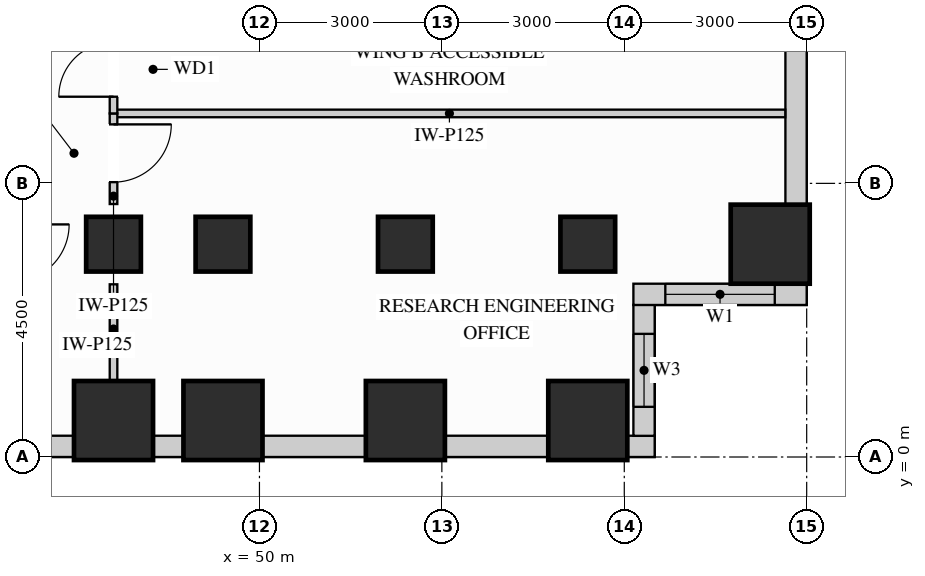
"""IFC4 building model, lengths in metres.
Left out: names, types, materials, properties, quantities, classifications, styles, units other than length and angle.
Written with IfcOpenShell. Run it as: python <this file> out.ifc"""

import sys

from ifc_helpers import new_model, si_unit, direction, frame, frame_2d, origin, origin_2d, place, context, subcontext, project, spatial, rectangle, extrude, source, transform, mapped, element, fill, save


model = new_model("IFC4")
c1 = context("Model", 3, precision=1e-05, world=origin(), true_north=direction((0.0, 1.0)))
c2 = subcontext(c1, "Body", "Model", "MODEL_VIEW")
j1 = project(units=[si_unit("LENGTHUNIT", "METRE"), si_unit("PLANEANGLEUNIT", "RADIAN")], contexts=[c1])
p1 = place(None, origin())
s1 = spatial("IfcSite", under=j1, at=p1, CompositionType="ELEMENT")
p2 = place(p1, origin())
s2 = spatial("IfcBuilding", under=s1, at=p2, CompositionType="ELEMENT")
p3 = place(p2, frame((0.0, 0.0, 36.9)))
s3 = spatial("IfcBuildingStorey", under=s2, at=p3, CompositionType="ELEMENT", Elevation=36.9)
m1 = source(origin(), c2, "Body", "SweptSolid", [
    extrude(rectangle(XDim=0.9, YDim=0.9, at=origin_2d()), origin(), (0.0, 0.0, 1.0), 3.38),
])
for number, where, z_axis, x_axis in (
    (1, (47.6, 3.5, 0.0), (0.0, 0.0, 1.0), (1.0, 0.0, 0.0)),
    (2, (49.4, 3.5, 0.0), (0.0, 0.0, 1.0), (1.0, 0.0, 0.0)),
    (3, (52.4, 3.5, 0.0), (0.0, 0.0, 1.0), (1.0, 0.0, 0.0)),
    (4, (55.4, 3.5, 0.0), (0.0, 0.0, 1.0), (1.0, 0.0, 0.0)),
):
    element("IfcColumn", number, at=place(p3, frame(where, z_axis=z_axis, x_axis=x_axis)), inside=s3, PredefinedType="COLUMN", context=c2, shape_type="MappedRepresentation", body=[
        mapped(m1, transform((0.0, 0.0, 0.0), x_axis=(1.0, 0.0, 0.0), y_axis=(0.0, 1.0, 0.0), z_axis=(0.0, 0.0, 1.0))),
    ])
m2 = source(origin(), c2, "Body", "SweptSolid", [
    extrude(rectangle(XDim=1.3, YDim=1.3, at=origin_2d()), origin(), (0.0, 0.0, 1.0), 3.38),
])
for number, where, z_axis, x_axis in (
    (5, (58.4, 3.5, 0.0), (0.0, 0.0, 1.0), (1.0, 0.0, 0.0)),
    (6, (47.6, 0.6, 0.0), (0.0, 0.0, 1.0), (1.0, 0.0, 0.0)),
    (7, (49.4, 0.6, 0.0), (0.0, 0.0, 1.0), (1.0, 0.0, 0.0)),
    (8, (52.4, 0.6, 0.0), (0.0, 0.0, 1.0), (1.0, 0.0, 0.0)),
    (9, (55.4, 0.6, 0.0), (0.0, 0.0, 1.0), (1.0, 0.0, 0.0)),
):
    element("IfcColumn", number, at=place(p3, frame(where, z_axis=z_axis, x_axis=x_axis)), inside=s3, PredefinedType="COLUMN", context=c2, shape_type="MappedRepresentation", body=[
        mapped(m2, transform((0.0, 0.0, 0.0), x_axis=(1.0, 0.0, 0.0), y_axis=(0.0, 1.0, 0.0), z_axis=(0.0, 0.0, 1.0))),
    ])
p4 = place(p3, frame((40.648, 0.175, 0.0), z_axis=(0.0, 0.0, 1.0), x_axis=(1.0, 0.0, 0.0)))
e10 = element("IfcWall", 10, at=p4, inside=s3, PredefinedType="SOLIDWALL", context=c2, shape_type="SweptSolid", body=[
    extrude(rectangle(XDim=6.304, YDim=0.35, at=frame_2d((3.152, 0.0))), origin(), (0.0, 0.0, 1.0), 2.51),
])
p5 = place(p4, frame((0.687, 0.0, 0.78)))
e11 = element("IfcOpeningElement", 11, at=p5, cuts=e10, PredefinedType="OPENING", context=c2, shape_type="SweptSolid", body=[
    extrude(rectangle(XDim=1.8, YDim=1.55, at=frame_2d((0.9, 0.775))), frame((0.0, 0.185, 0.0), z_axis=(0.0, -1.0, 0.0), x_axis=(1.0, 0.0, 0.0)), (0.0, 0.0, 1.0), 0.37),
])
p6 = place(p4, frame((2.855, 0.0, 0.78)))
e12 = element("IfcOpeningElement", 12, at=p6, cuts=e10, PredefinedType="OPENING", context=c2, shape_type="SweptSolid", body=[
    extrude(rectangle(XDim=1.8, YDim=1.55, at=frame_2d((0.9, 0.775))), frame((0.0, 0.185, 0.0), z_axis=(0.0, -1.0, 0.0), x_axis=(1.0, 0.0, 0.0)), (0.0, 0.0, 1.0), 0.37),
])
m3 = source(origin(), c2, "Body", "SweptSolid", [
    extrude(rectangle(XDim=0.504, YDim=0.35, at=frame_2d((0.252, 0.0))), origin(), (0.0, 0.0, 1.0), 3.365),
])
p7 = place(p3, frame((48.248, 0.175, 0.0), z_axis=(0.0, 0.0, 1.0), x_axis=(1.0, 0.0, 0.0)))
e13 = element("IfcWall", 13, at=p7, inside=s3, PredefinedType="SOLIDWALL", context=c2, shape_type="MappedRepresentation", body=[
    mapped(m3, transform((0.0, 0.0, 0.0), x_axis=(1.0, 0.0, 0.0), y_axis=(0.0, 1.0, 0.0), z_axis=(0.0, 0.0, 1.0))),
])
m4 = source(origin(), c2, "Body", "SweptSolid", [
    extrude(rectangle(XDim=1.704, YDim=0.35, at=frame_2d((0.852, 0.0))), origin(), (0.0, 0.0, 1.0), 2.51),
])
for number, where, z_axis, x_axis in (
    (14, (50.048, 0.175, 0.0), (0.0, 0.0, 1.0), (1.0, 0.0, 0.0)),
    (15, (53.048, 0.175, 0.0), (0.0, 0.0, 1.0), (1.0, 0.0, 0.0)),
):
    element("IfcWall", number, at=place(p3, frame(where, z_axis=z_axis, x_axis=x_axis)), inside=s3, PredefinedType="SOLIDWALL", context=c2, shape_type="MappedRepresentation", body=[
        mapped(m4, transform((0.0, 0.0, 0.0), x_axis=(1.0, 0.0, 0.0), y_axis=(0.0, 1.0, 0.0), z_axis=(0.0, 0.0, 1.0))),
    ])
m5 = source(origin(), c2, "Body", "SweptSolid", [
    extrude(rectangle(XDim=0.452, YDim=0.35, at=frame_2d((0.226, 0.0))), origin(), (0.0, 0.0, 1.0), 3.365),
])
p8 = place(p3, frame((56.048, 0.175, 0.0), z_axis=(0.0, 0.0, 1.0), x_axis=(1.0, 0.0, 0.0)))
e16 = element("IfcWall", 16, at=p8, inside=s3, PredefinedType="SOLIDWALL", context=c2, shape_type="MappedRepresentation", body=[
    mapped(m5, transform((0.0, 0.0, 0.0), x_axis=(1.0, 0.0, 0.0), y_axis=(0.0, 1.0, 0.0), z_axis=(0.0, 0.0, 1.0))),
])
p9 = place(p3, frame((56.325, 0.348, 0.0), z_axis=(0.0, 0.0, 1.0), x_axis=(0.0, 1.0, 0.0)))
e17 = element("IfcWall", 17, at=p9, inside=s3, PredefinedType="SOLIDWALL", context=c2, shape_type="SweptSolid", body=[
    extrude(rectangle(XDim=2.154, YDim=0.35, at=frame_2d((1.077, 0.0))), origin(), (0.0, 0.0, 1.0), 3.365),
])
p10 = place(p9, frame((0.477, 0.0, 0.78)))
e18 = element("IfcOpeningElement", 18, at=p10, cuts=e17, PredefinedType="OPENING", context=c2, shape_type="SweptSolid", body=[
    extrude(rectangle(XDim=1.2, YDim=2.1, at=frame_2d((0.6, 1.05))), frame((0.0, 0.185, 0.0), z_axis=(0.0, -1.0, 0.0), x_axis=(1.0, 0.0, 0.0)), (0.0, 0.0, 1.0), 0.37),
])
p11 = place(p3, frame((56.15, 2.675, 0.0), z_axis=(0.0, 0.0, 1.0), x_axis=(1.0, 0.0, 0.0)))
e19 = element("IfcWall", 19, at=p11, inside=s3, PredefinedType="SOLIDWALL", context=c2, shape_type="SweptSolid", body=[
    extrude(rectangle(XDim=2.85, YDim=0.35, at=frame_2d((1.425, 0.0))), origin(), (0.0, 0.0, 1.0), 3.365),
])
p12 = place(p11, frame((0.525, 0.0, 0.78)))
e20 = element("IfcOpeningElement", 20, at=p12, cuts=e19, PredefinedType="OPENING", context=c2, shape_type="SweptSolid", body=[
    extrude(rectangle(XDim=1.8, YDim=2.1, at=frame_2d((0.9, 1.05))), frame((0.0, 0.185, 0.0), z_axis=(0.0, -1.0, 0.0), x_axis=(1.0, 0.0, 0.0)), (0.0, 0.0, 1.0), 0.37),
])
m6 = source(origin(), c2, "Body", "SweptSolid", [
    extrude(rectangle(XDim=3.204, YDim=0.35, at=frame_2d((1.602, 0.0))), origin(), (0.0, 0.0, 1.0), 2.51),
])
p13 = place(p3, frame((58.825, 4.148, 0.0), z_axis=(0.0, 0.0, 1.0), x_axis=(0.0, 1.0, 0.0)))
e21 = element("IfcWall", 21, at=p13, inside=s3, PredefinedType="SOLIDWALL", context=c2, shape_type="MappedRepresentation", body=[
    mapped(m6, transform((0.0, 0.0, 0.0), x_axis=(1.0, 0.0, 0.0), y_axis=(0.0, 1.0, 0.0), z_axis=(0.0, 0.0, 1.0))),
])
m7 = source(origin(), c2, "Body", "SweptSolid", [
    extrude(rectangle(XDim=11.048, YDim=0.125, at=frame_2d((5.524, 0.0))), origin(), (0.0, 0.0, 1.0), 3.365),
])
p14 = place(p3, frame((47.6, 5.65, 0.0), z_axis=(0.0, 0.0, 1.0), x_axis=(1.0, 0.0, 0.0)))
e22 = element("IfcWall", 22, at=p14, inside=s3, PredefinedType="PARTITIONING", context=c2, shape_type="MappedRepresentation", body=[
    mapped(m7, transform((0.0, 0.0, 0.0), x_axis=(1.0, 0.0, 0.0), y_axis=(0.0, 1.0, 0.0), z_axis=(0.0, 0.0, 1.0))),
])
p15 = place(p3, frame((47.6, 4.16, 0.0), z_axis=(0.0, 0.0, 1.0), x_axis=(0.0, 1.0, 0.0)))
e23 = element("IfcWall", 23, at=p15, inside=s3, PredefinedType="PARTITIONING", context=c2, shape_type="SweptSolid", body=[
    extrude(rectangle(XDim=1.49, YDim=0.125, at=frame_2d((0.745, 0.0))), origin(), (0.0, 0.0, 1.0), 2.67),
])
p16 = place(p15, frame((0.36, 0.0, 0.0)))
e24 = element("IfcOpeningElement", 24, at=p16, cuts=e23, PredefinedType="OPENING", context=c2, shape_type="SweptSolid", body=[
    extrude(rectangle(XDim=0.95, YDim=2.15, at=frame_2d((0.475, 1.075))), frame((0.0, 0.073, 0.0), z_axis=(0.0, -1.0, 0.0), x_axis=(1.0, 0.0, 0.0)), (0.0, 0.0, 1.0), 0.145),
])
m8 = source(origin(), c2, "Body", "SweptSolid", [
    extrude(rectangle(XDim=1.58, YDim=0.125, at=frame_2d((0.79, 0.0))), origin(), (0.0, 0.0, 1.0), 2.67),
])
p17 = place(p3, frame((47.6, 1.26, 0.0), z_axis=(0.0, 0.0, 1.0), x_axis=(0.0, 1.0, 0.0)))
e25 = element("IfcWall", 25, at=p17, inside=s3, PredefinedType="PARTITIONING", context=c2, shape_type="MappedRepresentation", body=[
    mapped(m8, transform((0.0, 0.0, 0.0), x_axis=(1.0, 0.0, 0.0), y_axis=(0.0, 1.0, 0.0), z_axis=(0.0, 0.0, 1.0))),
])
p18 = place(p3, frame((47.6, 5.65, 0.0), z_axis=(0.0, 0.0, 1.0), x_axis=(0.0, 1.0, 0.0)))
e26 = element("IfcWall", 26, at=p18, inside=s3, PredefinedType="PARTITIONING", context=c2, shape_type="SweptSolid", body=[
    extrude(rectangle(XDim=1.5, YDim=0.125, at=frame_2d((0.75, 0.0))), origin(), (0.0, 0.0, 1.0), 2.67),
])
p19 = place(p18, frame((0.275, 0.0, 0.0)))
e27 = element("IfcOpeningElement", 27, at=p19, cuts=e26, PredefinedType="OPENING", context=c2, shape_type="SweptSolid", body=[
    extrude(rectangle(XDim=0.9, YDim=2.15, at=frame_2d((0.45, 1.075))), frame((0.0, 0.073, 0.0), z_axis=(0.0, -1.0, 0.0), x_axis=(1.0, 0.0, 0.0)), (0.0, 0.0, 1.0), 0.145),
])
m9 = source(origin(), c2, "Body", "SweptSolid", [
    extrude(rectangle(XDim=0.95, YDim=2.15, at=frame_2d((0.475, 1.075))), frame((0.0, 0.025, 0.0), z_axis=(0.0, -1.0, 0.0), x_axis=(1.0, 0.0, 0.0)), (0.0, 0.0, 1.0), 0.05),
])
p20 = place(p16, origin())
e28 = element("IfcDoor", 28, at=p20, inside=s3, OperationType="SINGLE_SWING_RIGHT", PredefinedType="DOOR", context=c2, shape_type="MappedRepresentation", body=[
    mapped(m9, transform((0.0, 0.0, 0.0), x_axis=(1.0, 0.0, 0.0), y_axis=(0.0, 1.0, 0.0), z_axis=(0.0, 0.0, 1.0))),
])
fill(e24, e28)
m10 = source(origin(), c2, "Body", "SweptSolid", [
    extrude(rectangle(XDim=0.9, YDim=2.15, at=frame_2d((0.45, 1.075))), frame((0.0, 0.025, 0.0), z_axis=(0.0, -1.0, 0.0), x_axis=(1.0, 0.0, 0.0)), (0.0, 0.0, 1.0), 0.05),
])
p21 = place(p19, origin())
e29 = element("IfcDoor", 29, at=p21, inside=s3, OperationType="SINGLE_SWING_LEFT", PredefinedType="DOOR", context=c2, shape_type="MappedRepresentation", body=[
    mapped(m10, transform((0.0, 0.0, 0.0), x_axis=(1.0, 0.0, 0.0), y_axis=(0.0, 1.0, 0.0), z_axis=(0.0, 0.0, 1.0))),
])
fill(e27, e29)
m11 = source(origin(), c2, "Body", "SweptSolid", [
    extrude(rectangle(XDim=1.8, YDim=2.1, at=frame_2d((0.9, 1.05))), frame((0.0, 0.03, 0.0), z_axis=(0.0, -1.0, 0.0), x_axis=(1.0, 0.0, 0.0)), (0.0, 0.0, 1.0), 0.06),
])
p22 = place(p12, origin())
e30 = element("IfcWindow", 30, at=p22, inside=s3, PartitioningType="SINGLE_PANEL", PredefinedType="WINDOW", context=c2, shape_type="MappedRepresentation", body=[
    mapped(m11, transform((0.0, 0.0, 0.0), x_axis=(1.0, 0.0, 0.0), y_axis=(0.0, 1.0, 0.0), z_axis=(0.0, 0.0, 1.0))),
])
fill(e20, e30)
m12 = source(origin(), c2, "Body", "SweptSolid", [
    extrude(rectangle(XDim=1.2, YDim=2.1, at=frame_2d((0.6, 1.05))), frame((0.0, 0.03, 0.0), z_axis=(0.0, -1.0, 0.0), x_axis=(1.0, 0.0, 0.0)), (0.0, 0.0, 1.0), 0.06),
])
p23 = place(p10, origin())
e31 = element("IfcWindow", 31, at=p23, inside=s3, PartitioningType="SINGLE_PANEL", PredefinedType="WINDOW", context=c2, shape_type="MappedRepresentation", body=[
    mapped(m12, transform((0.0, 0.0, 0.0), x_axis=(1.0, 0.0, 0.0), y_axis=(0.0, 1.0, 0.0), z_axis=(0.0, 0.0, 1.0))),
])
fill(e18, e31)
save(model, sys.argv[1])
